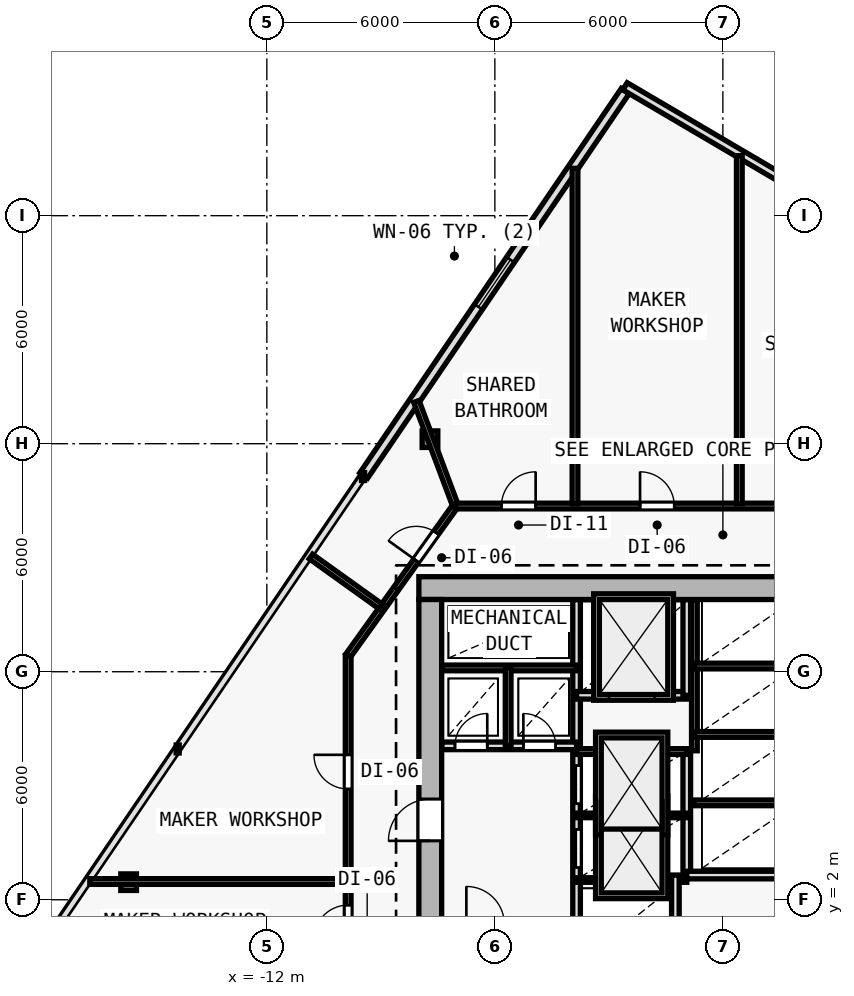
"""IFC4 building model, lengths in metres.
Left out: names, types, materials, properties, quantities, classifications, styles, units other than length and angle.
Written with IfcOpenShell. Run it as: python <this file> out.ifc"""

import sys

from ifc_helpers import new_model, si_unit, direction, frame, frame_2d, origin, origin_2d, place, context, subcontext, project, spatial, rectangle, i_section, extrude, element, fill, save


model = new_model("IFC4")
c1 = context("Model", 3, precision=1e-05, world=origin(), true_north=direction((0.0, 1.0)))
c2 = subcontext(c1, "Body", "Model", "MODEL_VIEW")
j1 = project(units=[si_unit("LENGTHUNIT", "METRE"), si_unit("PLANEANGLEUNIT", "RADIAN")], contexts=[c1])
p1 = place(None, origin())
s1 = spatial("IfcSite", under=j1, at=p1, CompositionType="ELEMENT")
p2 = place(p1, origin())
s2 = spatial("IfcBuilding", under=s1, at=p2, CompositionType="ELEMENT")
p3 = place(p2, frame((0.0, 0.0, 58.8)))
s3 = spatial("IfcBuildingStorey", under=s2, at=p3, CompositionType="ELEMENT", Elevation=58.8)
for number, where, z_axis, x_axis in (
    (1, (-7.7, 10.2, 0.0), (0.0, 0.0, 1.0), (1.0, 0.0, 0.0)),
    (2, (-7.7, 2.0, 0.0), (0.0, 0.0, 1.0), (1.0, 0.0, 0.0)),
):
    element("IfcColumn", number, at=place(p3, frame(where, z_axis=z_axis, x_axis=x_axis)), inside=s3, PredefinedType="COLUMN", context=c2, shape_type="SweptSolid", body=[
        extrude(i_section(OverallWidth=0.416, OverallDepth=0.446, WebThickness=0.025, FlangeThickness=0.04, FilletRadius=0.015, at=origin_2d()), origin(), (0.0, 0.0, 1.0), 3.6),
    ])
p4 = place(p3, frame((-7.707, 14.119, 0.005), z_axis=(0.008842562123, -0.00251672922, 0.999957736691), x_axis=(0.273743828055, 0.961802639112, 0.0)))
e3 = element("IfcColumn", 3, at=p4, inside=s3, PredefinedType="COLUMN", context=c2, shape_type="SweptSolid", body=[
    extrude(i_section(OverallWidth=0.412, OverallDepth=0.435, WebThickness=0.023, FlangeThickness=0.037, FilletRadius=0.015, at=origin_2d()), origin(), (0.0, 0.0, 1.0), 3.589),
])
p5 = place(p3, frame((-15.637, 2.463, 0.005), z_axis=(0.017070406608, 0.009521342331, 0.99980895438), x_axis=(-0.487119351792, 0.873335409284, 0.0)))
e4 = element("IfcColumn", 4, at=p5, inside=s3, PredefinedType="COLUMN", context=c2, shape_type="SweptSolid", body=[
    extrude(i_section(OverallWidth=0.412, OverallDepth=0.435, WebThickness=0.023, FlangeThickness=0.037, FilletRadius=0.015, at=origin_2d()), origin(), (0.0, 0.0, 1.0), 3.59),
])
p6 = place(p3, frame((-9.451, 13.163, 0.0), z_axis=(0.0, 0.0, 1.0), x_axis=(0.562478152622, 0.826812147844, 0.0)))
e5 = element("IfcWall", 5, at=p6, inside=s3, PredefinedType="SOLIDWALL", context=c2, shape_type="SweptSolid", body=[
    extrude(rectangle(XDim=12.232, YDim=0.25, at=frame_2d((6.116, 0.0))), origin(), (0.0, 0.0, 1.0), 3.35),
])
p7 = place(p6, frame((5.366, 0.0, 0.62)))
e6 = element("IfcOpeningElement", 6, at=p7, cuts=e5, PredefinedType="OPENING", context=c2, shape_type="SweptSolid", body=[
    extrude(rectangle(XDim=1.5, YDim=2.0, at=frame_2d((0.75, 1.0))), frame((0.0, 0.135, 0.0), z_axis=(0.0, -1.0, 0.0), x_axis=(1.0, 0.0, 0.0)), (0.0, 0.0, 1.0), 0.27),
])
p8 = place(p3, frame((-2.572, 23.403, 0.0), z_axis=(0.0, 0.0, 1.0), x_axis=(0.862137551275, -0.506674296449, 0.0)))
e7 = element("IfcWall", 7, at=p8, inside=s3, PredefinedType="SOLIDWALL", context=c2, shape_type="SweptSolid", body=[
    extrude(rectangle(XDim=5.307, YDim=0.22, at=frame_2d((2.654, 0.0))), origin(), (0.0, 0.0, 1.0), 3.35),
])
p9 = place(p3, frame((8.0, 10.2, 0.0), z_axis=(0.0, 0.0, 1.0), x_axis=(-1.0, 0.0, 0.0)))
e8 = element("IfcWall", 8, at=p9, inside=s3, PredefinedType="SHEAR", context=c2, shape_type="SweptSolid", body=[
    extrude(rectangle(XDim=16.0, YDim=0.6, at=frame_2d((8.0, 0.0))), origin(), (0.0, 0.0, 1.0), 3.35),
])
p10 = place(p9, frame((4.45, 0.0, 0.0)))
e9 = element("IfcOpeningElement", 9, at=p10, cuts=e8, PredefinedType="OPENING", context=c2, shape_type="SweptSolid", body=[
    extrude(rectangle(XDim=1.1, YDim=2.15, at=frame_2d((0.55, 1.075))), frame((0.0, 0.31, 0.0), z_axis=(0.0, -1.0, 0.0), x_axis=(1.0, 0.0, 0.0)), (0.0, 0.0, 1.0), 0.62),
])
p11 = place(p3, frame((-7.7, -9.1, 0.0), z_axis=(0.0, 0.0, 1.0), x_axis=(0.0, 1.0, 0.0)))
e10 = element("IfcWall", 10, at=p11, inside=s3, PredefinedType="SHEAR", context=c2, shape_type="SweptSolid", body=[
    extrude(rectangle(XDim=19.0, YDim=0.6, at=frame_2d((9.5, 0.0))), origin(), (0.0, 0.0, 1.0), 3.35),
])
p12 = place(p11, frame((12.65, 0.0, 0.0)))
e11 = element("IfcOpeningElement", 11, at=p12, cuts=e10, PredefinedType="OPENING", context=c2, shape_type="SweptSolid", body=[
    extrude(rectangle(XDim=1.1, YDim=2.15, at=frame_2d((0.55, 1.075))), frame((0.0, 0.31, 0.0), z_axis=(0.0, -1.0, 0.0), x_axis=(1.0, 0.0, 0.0)), (0.0, 0.0, 1.0), 0.62),
])
p13 = place(p3, frame((-3.85, 1.35, 0.0), z_axis=(0.0, 0.0, 1.0), x_axis=(0.0, 1.0, 0.0)))
e12 = element("IfcWall", 12, at=p13, inside=s3, PredefinedType="SOLIDWALL", context=c2, shape_type="SweptSolid", body=[
    extrude(rectangle(XDim=8.545, YDim=0.2, at=frame_2d((4.272, 0.0))), origin(), (0.0, 0.0, 1.0), 3.35),
])
p14 = place(p13, frame((1.5, 0.0, 0.0)))
e13 = element("IfcOpeningElement", 13, at=p14, cuts=e12, PredefinedType="OPENING", context=c2, shape_type="SweptSolid", body=[
    extrude(rectangle(XDim=1.0, YDim=2.15, at=frame_2d((0.5, 1.075))), frame((0.0, 0.11, 0.0), z_axis=(0.0, -1.0, 0.0), x_axis=(1.0, 0.0, 0.0)), (0.0, 0.0, 1.0), 0.22),
])
p15 = place(p13, frame((3.18, 0.0, 0.0)))
e14 = element("IfcOpeningElement", 14, at=p15, cuts=e12, PredefinedType="OPENING", context=c2, shape_type="SweptSolid", body=[
    extrude(rectangle(XDim=1.0, YDim=2.15, at=frame_2d((0.5, 1.075))), frame((0.0, 0.11, 0.0), z_axis=(0.0, -1.0, 0.0), x_axis=(1.0, 0.0, 0.0)), (0.0, 0.0, 1.0), 0.22),
])
p16 = place(p3, frame((-7.395, 6.05, 0.0), z_axis=(0.0, 0.0, 1.0), x_axis=(1.0, 0.0, 0.0)))
e15 = element("IfcWall", 15, at=p16, inside=s3, PredefinedType="SOLIDWALL", context=c2, shape_type="SweptSolid", body=[
    extrude(rectangle(XDim=3.545, YDim=0.2, at=frame_2d((1.772, 0.0))), origin(), (0.0, 0.0, 1.0), 3.35),
])
p17 = place(p16, frame((0.345, 0.0, 0.0)))
e16 = element("IfcOpeningElement", 16, at=p17, cuts=e15, PredefinedType="OPENING", context=c2, shape_type="SweptSolid", body=[
    extrude(rectangle(XDim=0.85, YDim=2.1, at=frame_2d((0.425, 1.05))), frame((0.0, 0.11, 0.0), z_axis=(0.0, -1.0, 0.0), x_axis=(1.0, 0.0, 0.0)), (0.0, 0.0, 1.0), 0.22),
])
p18 = place(p16, frame((2.145, 0.0, 0.0)))
e17 = element("IfcOpeningElement", 17, at=p18, cuts=e15, PredefinedType="OPENING", context=c2, shape_type="SweptSolid", body=[
    extrude(rectangle(XDim=0.85, YDim=2.1, at=frame_2d((0.425, 1.05))), frame((0.0, 0.11, 0.0), z_axis=(0.0, -1.0, 0.0), x_axis=(1.0, 0.0, 0.0)), (0.0, 0.0, 1.0), 0.22),
])
p19 = place(p3, frame((-7.395, 8.1, 0.0), z_axis=(0.0, 0.0, 1.0), x_axis=(1.0, 0.0, 0.0)))
e18 = element("IfcWall", 18, at=p19, inside=s3, PredefinedType="PARTITIONING", context=c2, shape_type="SweptSolid", body=[
    extrude(rectangle(XDim=3.545, YDim=0.15, at=frame_2d((1.772, 0.0))), origin(), (0.0, 0.0, 1.0), 3.35),
])
p20 = place(p3, frame((-5.65, 6.05, 0.0), z_axis=(0.0, 0.0, 1.0), x_axis=(0.0, 1.0, 0.0)))
e19 = element("IfcWall", 19, at=p20, inside=s3, PredefinedType="PARTITIONING", context=c2, shape_type="SweptSolid", body=[
    extrude(rectangle(XDim=2.05, YDim=0.15, at=frame_2d((1.025, 0.0))), origin(), (0.0, 0.0, 1.0), 3.35),
])
p21 = place(p3, frame((-0.95, 2.65, 0.0), z_axis=(0.0, 0.0, 1.0), x_axis=(0.0, 1.0, 0.0)))
e20 = element("IfcWall", 20, at=p21, inside=s3, PredefinedType="SOLIDWALL", context=c2, shape_type="SweptSolid", body=[
    extrude(rectangle(XDim=3.27, YDim=0.2, at=frame_2d((1.635, 0.0))), origin(), (0.0, 0.0, 1.0), 3.35),
])
for number, where, z_axis, x_axis in (
    (21, (-3.85, 2.52, 0.0), (0.0, 0.0, 1.0), (1.0, 0.0, 0.0)),
    (22, (-3.85, 4.22, 0.0), (0.0, 0.0, 1.0), (1.0, 0.0, 0.0)),
):
    element("IfcWall", number, at=place(p3, frame(where, z_axis=z_axis, x_axis=x_axis)), inside=s3, PredefinedType="PARTITIONING", context=c2, shape_type="SweptSolid", body=[
        extrude(rectangle(XDim=2.9, YDim=0.12, at=frame_2d((1.45, 0.0))), origin(), (0.0, 0.0, 1.0), 3.35),
    ])
p22 = place(p3, frame((-3.85, 5.9, 0.0), z_axis=(0.0, 0.0, 1.0), x_axis=(1.0, 0.0, 0.0)))
e23 = element("IfcWall", 23, at=p22, inside=s3, PredefinedType="PARTITIONING", context=c2, shape_type="SweptSolid", body=[
    extrude(rectangle(XDim=2.9, YDim=0.15, at=frame_2d((1.45, 0.0))), origin(), (0.0, 0.0, 1.0), 3.35),
])
p23 = place(p3, frame((-3.85, 7.38, 0.0), z_axis=(0.0, 0.0, 1.0), x_axis=(1.0, 0.0, 0.0)))
e24 = element("IfcWall", 24, at=p23, inside=s3, PredefinedType="SOLIDWALL", context=c2, shape_type="SweptSolid", body=[
    extrude(rectangle(XDim=2.9, YDim=0.2, at=frame_2d((1.45, 0.0))), origin(), (0.0, 0.0, 1.0), 3.35),
])
p24 = place(p23, frame((0.85, 0.0, 0.0)))
e25 = element("IfcOpeningElement", 25, at=p24, cuts=e24, PredefinedType="OPENING", context=c2, shape_type="SweptSolid", body=[
    extrude(rectangle(XDim=1.2, YDim=2.2, at=frame_2d((0.6, 1.1))), frame((0.0, 0.11, 0.0), z_axis=(0.0, -1.0, 0.0), x_axis=(1.0, 0.0, 0.0)), (0.0, 0.0, 1.0), 0.22),
])
p25 = place(p3, frame((-0.95, 7.38, 0.0), z_axis=(0.0, 0.0, 1.0), x_axis=(0.0, 1.0, 0.0)))
e26 = element("IfcWall", 26, at=p25, inside=s3, PredefinedType="SOLIDWALL", context=c2, shape_type="SweptSolid", body=[
    extrude(rectangle(XDim=2.515, YDim=0.2, at=frame_2d((1.258, 0.0))), origin(), (0.0, 0.0, 1.0), 3.35),
])
p26 = place(p3, frame((-1.25, -6.05, 0.0), z_axis=(0.0, 0.0, 1.0), x_axis=(0.0, 1.0, 0.0)))
e27 = element("IfcWall", 27, at=p26, inside=s3, PredefinedType="SOLIDWALL", context=c2, shape_type="SweptSolid", body=[
    extrude(rectangle(XDim=8.7, YDim=0.2, at=frame_2d((4.35, 0.0))), origin(), (0.0, 0.0, 1.0), 3.35),
])
p27 = place(p3, frame((-0.95, 2.65, 0.0), z_axis=(0.0, 0.0, 1.0), x_axis=(1.0, 0.0, 0.0)))
e28 = element("IfcWall", 28, at=p27, inside=s3, PredefinedType="SOLIDWALL", context=c2, shape_type="SweptSolid", body=[
    extrude(rectangle(XDim=2.9, YDim=0.2, at=frame_2d((1.45, 0.0))), origin(), (0.0, 0.0, 1.0), 3.35),
])
p28 = place(p3, frame((-0.75, 5.92, 0.0), z_axis=(0.0, 0.0, 1.0), x_axis=(0.0, 1.0, 0.0)))
e29 = element("IfcWall", 29, at=p28, inside=s3, PredefinedType="PARTITIONING", context=c2, shape_type="SweptSolid", body=[
    extrude(rectangle(XDim=3.975, YDim=0.15, at=frame_2d((1.988, 0.0))), origin(), (0.0, 0.0, 1.0), 3.35),
])
for number, where, z_axis, x_axis in (
    (30, (-0.75, 4.55, 0.0), (0.0, 0.0, 1.0), (1.0, 0.0, 0.0)),
    (31, (-0.75, 6.35, 0.0), (0.0, 0.0, 1.0), (1.0, 0.0, 0.0)),
    (32, (-0.75, 8.15, 0.0), (0.0, 0.0, 1.0), (1.0, 0.0, 0.0)),
):
    element("IfcWall", number, at=place(p3, frame(where, z_axis=z_axis, x_axis=x_axis)), inside=s3, PredefinedType="PARTITIONING", context=c2, shape_type="SweptSolid", body=[
        extrude(rectangle(XDim=2.7, YDim=0.15, at=frame_2d((1.35, 0.0))), origin(), (0.0, 0.0, 1.0), 3.35),
    ])
p29 = place(p3, frame((-9.86, -11.56, 0.0), z_axis=(0.0, 0.0, 1.0), x_axis=(0.0, 1.0, 0.0)))
e33 = element("IfcWall", 33, at=p29, inside=s3, PredefinedType="PARTITIONING", context=c2, shape_type="SweptSolid", body=[
    extrude(rectangle(XDim=19.986, YDim=0.15, at=frame_2d((9.993, 0.0))), origin(), (0.0, 0.0, 1.0), 2.609),
])
p30 = place(p29, frame((9.867, 0.0, 0.0)))
e34 = element("IfcOpeningElement", 34, at=p30, cuts=e33, PredefinedType="OPENING", context=c2, shape_type="SweptSolid", body=[
    extrude(rectangle(XDim=0.9, YDim=2.1, at=frame_2d((0.45, 1.05))), frame((0.0, 0.085, 0.0), z_axis=(0.0, -1.0, 0.0), x_axis=(1.0, 0.0, 0.0)), (0.0, 0.0, 1.0), 0.17),
])
p31 = place(p29, frame((6.738, 0.0, 0.0)))
e35 = element("IfcOpeningElement", 35, at=p31, cuts=e33, PredefinedType="OPENING", context=c2, shape_type="SweptSolid", body=[
    extrude(rectangle(XDim=0.9, YDim=2.1, at=frame_2d((0.45, 1.05))), frame((0.0, 0.085, 0.0), z_axis=(0.0, -1.0, 0.0), x_axis=(1.0, 0.0, 0.0)), (0.0, 0.0, 1.0), 0.17),
])
p32 = place(p29, frame((3.573, 0.0, 0.0)))
e36 = element("IfcOpeningElement", 36, at=p32, cuts=e33, PredefinedType="OPENING", context=c2, shape_type="SweptSolid", body=[
    extrude(rectangle(XDim=0.9, YDim=2.1, at=frame_2d((0.45, 1.05))), frame((0.0, 0.085, 0.0), z_axis=(0.0, -1.0, 0.0), x_axis=(1.0, 0.0, 0.0)), (0.0, 0.0, 1.0), 0.17),
])
p33 = place(p29, frame((16.474, 0.0, 0.0)))
e37 = element("IfcOpeningElement", 37, at=p33, cuts=e33, PredefinedType="OPENING", context=c2, shape_type="SweptSolid", body=[
    extrude(rectangle(XDim=0.9, YDim=2.1, at=frame_2d((0.45, 1.05))), frame((0.0, 0.085, 0.0), z_axis=(0.0, -1.0, 0.0), x_axis=(1.0, 0.0, 0.0)), (0.0, 0.0, 1.0), 0.17),
])
p34 = place(p29, frame((12.52, 0.0, 0.0)))
e38 = element("IfcOpeningElement", 38, at=p34, cuts=e33, PredefinedType="OPENING", context=c2, shape_type="SweptSolid", body=[
    extrude(rectangle(XDim=0.9, YDim=2.1, at=frame_2d((0.45, 1.05))), frame((0.0, 0.085, 0.0), z_axis=(0.0, -1.0, 0.0), x_axis=(1.0, 0.0, 0.0)), (0.0, 0.0, 1.0), 0.17),
])
p35 = place(p3, frame((-9.86, 8.426, 0.0), z_axis=(0.0, 0.0, 1.0), x_axis=(0.582449511476, 0.812866881218, 0.0)))
e39 = element("IfcWall", 39, at=p35, inside=s3, PredefinedType="PARTITIONING", context=c2, shape_type="SweptSolid", body=[
    extrude(rectangle(XDim=4.84, YDim=0.15, at=frame_2d((2.42, 0.0))), origin(), (0.0, 0.0, 1.0), 2.725),
])
p36 = place(p35, frame((3.074, 0.0, 0.0)))
e40 = element("IfcOpeningElement", 40, at=p36, cuts=e39, PredefinedType="OPENING", context=c2, shape_type="SweptSolid", body=[
    extrude(rectangle(XDim=0.9, YDim=2.1, at=frame_2d((0.45, 1.05))), frame((0.0, 0.085, 0.0), z_axis=(0.0, -1.0, 0.0), x_axis=(1.0, 0.0, 0.0)), (0.0, 0.0, 1.0), 0.17),
])
p37 = place(p3, frame((-7.041, 12.36, 0.0), z_axis=(0.0, 0.0, 1.0), x_axis=(1.0, 0.0, 0.0)))
e41 = element("IfcWall", 41, at=p37, inside=s3, PredefinedType="PARTITIONING", context=c2, shape_type="SweptSolid", body=[
    extrude(rectangle(XDim=14.082, YDim=0.15, at=frame_2d((7.041, 0.0))), origin(), (0.0, 0.0, 1.0), 3.35),
])
p38 = place(p37, frame((12.441, 0.0, 0.0)))
e42 = element("IfcOpeningElement", 42, at=p38, cuts=e41, PredefinedType="OPENING", context=c2, shape_type="SweptSolid", body=[
    extrude(rectangle(XDim=0.9, YDim=2.1, at=frame_2d((0.45, 1.05))), frame((0.0, 0.085, 0.0), z_axis=(0.0, -1.0, 0.0), x_axis=(1.0, 0.0, 0.0)), (0.0, 0.0, 1.0), 0.17),
])
p39 = place(p37, frame((9.226, 0.0, 0.0)))
e43 = element("IfcOpeningElement", 43, at=p39, cuts=e41, PredefinedType="OPENING", context=c2, shape_type="SweptSolid", body=[
    extrude(rectangle(XDim=0.9, YDim=2.1, at=frame_2d((0.45, 1.05))), frame((0.0, 0.085, 0.0), z_axis=(0.0, -1.0, 0.0), x_axis=(1.0, 0.0, 0.0)), (0.0, 0.0, 1.0), 0.17),
])
p40 = place(p37, frame((4.862, 0.0, 0.0)))
e44 = element("IfcOpeningElement", 44, at=p40, cuts=e41, PredefinedType="OPENING", context=c2, shape_type="SweptSolid", body=[
    extrude(rectangle(XDim=0.9, YDim=2.1, at=frame_2d((0.45, 1.05))), frame((0.0, 0.085, 0.0), z_axis=(0.0, -1.0, 0.0), x_axis=(1.0, 0.0, 0.0)), (0.0, 0.0, 1.0), 0.17),
])
p41 = place(p37, frame((1.214, 0.0, 0.0)))
e45 = element("IfcOpeningElement", 45, at=p41, cuts=e41, PredefinedType="OPENING", context=c2, shape_type="SweptSolid", body=[
    extrude(rectangle(XDim=0.9, YDim=2.1, at=frame_2d((0.45, 1.05))), frame((0.0, 0.085, 0.0), z_axis=(0.0, -1.0, 0.0), x_axis=(1.0, 0.0, 0.0)), (0.0, 0.0, 1.0), 0.17),
])
p42 = place(p3, frame((-7.052, 12.41, 0.0), z_axis=(0.0, 0.0, 1.0), x_axis=(-0.351271817971, 0.936273523015, 0.0)))
e46 = element("IfcWall", 46, at=p42, inside=s3, PredefinedType="PARTITIONING", context=c2, shape_type="SweptSolid", body=[
    extrude(rectangle(XDim=2.885, YDim=0.15, at=frame_2d((1.442, 0.0))), origin(), (0.0, 0.0, 1.0), 2.725),
])
p43 = place(p3, frame((-9.92, 2.48, 0.0), z_axis=(0.0, 0.0, 1.0), x_axis=(-1.0, 0.0, 0.0)))
e47 = element("IfcWall", 47, at=p43, inside=s3, PredefinedType="PARTITIONING", context=c2, shape_type="SweptSolid", body=[
    extrude(rectangle(XDim=6.738, YDim=0.15, at=frame_2d((3.369, 0.0))), origin(), (0.0, 0.0, 1.0), 2.735),
])
p44 = place(p3, frame((0.433, 12.42, 0.0), z_axis=(0.0, 0.0, 1.0), x_axis=(0.0, 1.0, 0.0)))
e48 = element("IfcWall", 48, at=p44, inside=s3, PredefinedType="PARTITIONING", context=c2, shape_type="SweptSolid", body=[
    extrude(rectangle(XDim=9.159, YDim=0.15, at=frame_2d((4.58, 0.0))), origin(), (0.0, 0.0, 1.0), 2.735),
])
p45 = place(p3, frame((-9.008, 9.719, 0.0), z_axis=(0.0, 0.0, 1.0), x_axis=(-0.812920514328, 0.582374653797, 0.0)))
e49 = element("IfcWall", 49, at=p45, inside=s3, PredefinedType="PARTITIONING", context=c2, shape_type="SweptSolid", body=[
    extrude(rectangle(XDim=2.255, YDim=0.15, at=frame_2d((1.127, 0.0))), origin(), (0.0, 0.0, 1.0), 2.735),
])
p46 = place(p3, frame((-3.891, 12.42, 0.0), z_axis=(0.0, 0.0, 1.0), x_axis=(0.0, 1.0, 0.0)))
e50 = element("IfcWall", 50, at=p46, inside=s3, PredefinedType="PARTITIONING", context=c2, shape_type="SweptSolid", body=[
    extrude(rectangle(XDim=8.827, YDim=0.15, at=frame_2d((4.413, 0.0))), origin(), (0.0, 0.0, 1.0), 2.735),
])
p47 = place(p7, origin())
e51 = element("IfcWindow", 51, at=p47, inside=s3, PartitioningType="SINGLE_PANEL", PredefinedType="WINDOW", context=c2, shape_type="SweptSolid", body=[
    extrude(rectangle(XDim=1.5, YDim=2.0, at=frame_2d((0.75, 1.0))), frame((0.0, 0.03, 0.0), z_axis=(0.0, -1.0, 0.0), x_axis=(1.0, 0.0, 0.0)), (0.0, 0.0, 1.0), 0.06),
])
fill(e6, e51)
p48 = place(p12, origin())
e52 = element("IfcDoor", 52, at=p48, inside=s3, OperationType="SINGLE_SWING_LEFT", PredefinedType="DOOR", context=c2, shape_type="SweptSolid", body=[
    extrude(rectangle(XDim=1.1, YDim=2.15, at=frame_2d((0.55, 1.075))), frame((0.0, 0.025, 0.0), z_axis=(0.0, -1.0, 0.0), x_axis=(1.0, 0.0, 0.0)), (0.0, 0.0, 1.0), 0.05),
])
fill(e11, e52)
p49 = place(p17, origin())
e53 = element("IfcDoor", 53, at=p49, inside=s3, OperationType="SINGLE_SWING_RIGHT", PredefinedType="DOOR", context=c2, shape_type="SweptSolid", body=[
    extrude(rectangle(XDim=0.85, YDim=2.1, at=frame_2d((0.425, 1.05))), frame((0.0, 0.025, 0.0), z_axis=(0.0, -1.0, 0.0), x_axis=(1.0, 0.0, 0.0)), (0.0, 0.0, 1.0), 0.05),
])
fill(e16, e53)
p50 = place(p18, origin())
e54 = element("IfcDoor", 54, at=p50, inside=s3, OperationType="SINGLE_SWING_LEFT", PredefinedType="DOOR", context=c2, shape_type="SweptSolid", body=[
    extrude(rectangle(XDim=0.85, YDim=2.1, at=frame_2d((0.425, 1.05))), frame((0.0, 0.025, 0.0), z_axis=(0.0, -1.0, 0.0), x_axis=(1.0, 0.0, 0.0)), (0.0, 0.0, 1.0), 0.05),
])
fill(e17, e54)
p51 = place(p24, origin())
e55 = element("IfcDoor", 55, at=p51, inside=s3, OperationType="DOUBLE_DOOR_SLIDING", PredefinedType="DOOR", context=c2, shape_type="SweptSolid", body=[
    extrude(rectangle(XDim=1.2, YDim=2.2, at=frame_2d((0.6, 1.1))), frame((0.0, 0.025, 0.0), z_axis=(0.0, -1.0, 0.0), x_axis=(1.0, 0.0, 0.0)), (0.0, 0.0, 1.0), 0.05),
])
fill(e25, e55)
p52 = place(p14, origin())
e56 = element("IfcDoor", 56, at=p52, inside=s3, OperationType="DOUBLE_DOOR_SLIDING", PredefinedType="DOOR", context=c2, shape_type="SweptSolid", body=[
    extrude(rectangle(XDim=1.0, YDim=2.15, at=frame_2d((0.5, 1.075))), frame((0.0, 0.025, 0.0), z_axis=(0.0, -1.0, 0.0), x_axis=(1.0, 0.0, 0.0)), (0.0, 0.0, 1.0), 0.05),
])
fill(e13, e56)
p53 = place(p15, origin())
e57 = element("IfcDoor", 57, at=p53, inside=s3, OperationType="DOUBLE_DOOR_SLIDING", PredefinedType="DOOR", context=c2, shape_type="SweptSolid", body=[
    extrude(rectangle(XDim=1.0, YDim=2.15, at=frame_2d((0.5, 1.075))), frame((0.0, 0.025, 0.0), z_axis=(0.0, -1.0, 0.0), x_axis=(1.0, 0.0, 0.0)), (0.0, 0.0, 1.0), 0.05),
])
fill(e14, e57)
p54 = place(p40, origin())
e58 = element("IfcDoor", 58, at=p54, inside=s3, OperationType="SINGLE_SWING_LEFT", PredefinedType="DOOR", context=c2, shape_type="SweptSolid", body=[
    extrude(rectangle(XDim=0.9, YDim=2.1, at=frame_2d((0.45, 1.05))), frame((0.0, 0.025, 0.0), z_axis=(0.0, -1.0, 0.0), x_axis=(1.0, 0.0, 0.0)), (0.0, 0.0, 1.0), 0.05),
])
fill(e44, e58)
p55 = place(p41, origin())
e59 = element("IfcDoor", 59, at=p55, inside=s3, OperationType="SINGLE_SWING_RIGHT", PredefinedType="DOOR", context=c2, shape_type="SweptSolid", body=[
    extrude(rectangle(XDim=0.9, YDim=2.1, at=frame_2d((0.45, 1.05))), frame((0.0, 0.025, 0.0), z_axis=(0.0, -1.0, 0.0), x_axis=(1.0, 0.0, 0.0)), (0.0, 0.0, 1.0), 0.05),
])
fill(e45, e59)
p56 = place(p36, origin())
e60 = element("IfcDoor", 60, at=p56, inside=s3, OperationType="SINGLE_SWING_LEFT", PredefinedType="DOOR", context=c2, shape_type="SweptSolid", body=[
    extrude(rectangle(XDim=0.9, YDim=2.1, at=frame_2d((0.45, 1.05))), frame((0.0, 0.025, 0.0), z_axis=(0.0, -1.0, 0.0), x_axis=(1.0, 0.0, 0.0)), (0.0, 0.0, 1.0), 0.05),
])
fill(e40, e60)
p57 = place(p33, origin())
e61 = element("IfcDoor", 61, at=p57, inside=s3, OperationType="SINGLE_SWING_RIGHT", PredefinedType="DOOR", context=c2, shape_type="SweptSolid", body=[
    extrude(rectangle(XDim=0.9, YDim=2.1, at=frame_2d((0.45, 1.05))), frame((0.0, 0.025, 0.0), z_axis=(0.0, -1.0, 0.0), x_axis=(1.0, 0.0, 0.0)), (0.0, 0.0, 1.0), 0.05),
])
fill(e37, e61)
p58 = place(p34, origin())
e62 = element("IfcDoor", 62, at=p58, inside=s3, OperationType="SINGLE_SWING_LEFT", PredefinedType="DOOR", context=c2, shape_type="SweptSolid", body=[
    extrude(rectangle(XDim=0.9, YDim=2.1, at=frame_2d((0.45, 1.05))), frame((0.0, 0.025, 0.0), z_axis=(0.0, -1.0, 0.0), x_axis=(1.0, 0.0, 0.0)), (0.0, 0.0, 1.0), 0.05),
])
fill(e38, e62)
save(model, sys.argv[1])
